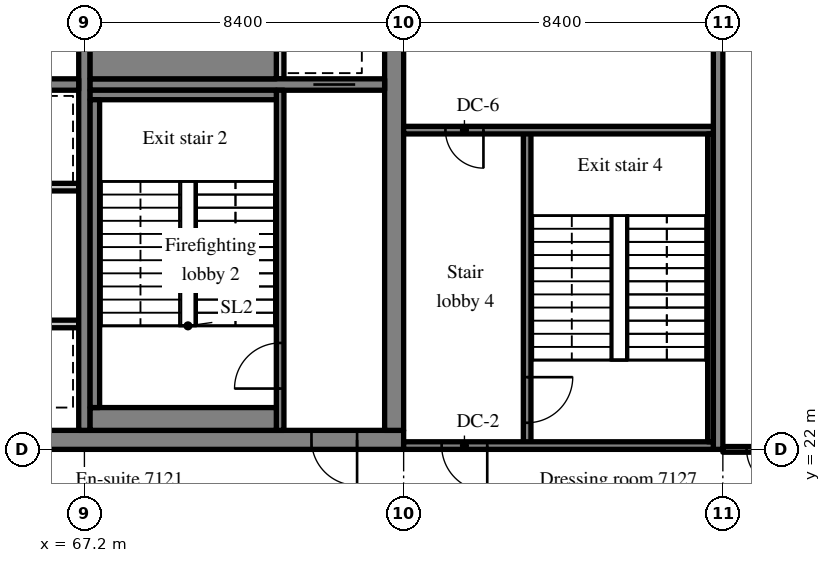
"""IFC4 building model, lengths in metres.
Left out: names, types, materials, properties, quantities, classifications, styles, units other than length and angle.
Written with IfcOpenShell. Run it as: python <this file> out.ifc"""

import sys

from ifc_helpers import new_model, si_unit, direction, frame, frame_2d, origin, place, context, subcontext, project, spatial, rectangle, extrude, source, transform, mapped, element, fill, save


model = new_model("IFC4")
c1 = context("Model", 3, precision=1e-05, world=origin(), true_north=direction((0.0, 1.0)))
c2 = subcontext(c1, "Body", "Model", "MODEL_VIEW")
j1 = project(units=[si_unit("LENGTHUNIT", "METRE"), si_unit("PLANEANGLEUNIT", "RADIAN")], contexts=[c1])
p1 = place(None, origin())
s1 = spatial("IfcSite", under=j1, at=p1, CompositionType="ELEMENT")
p2 = place(p1, origin())
s2 = spatial("IfcBuilding", under=s1, at=p2, CompositionType="ELEMENT")
p3 = place(p2, frame((0.0, 0.0, 297.7)))
s3 = spatial("IfcBuildingStorey", under=s2, at=p3, CompositionType="ELEMENT", Elevation=297.7)
m1 = source(origin(), c2, "Body", "SweptSolid", [
    extrude(rectangle(XDim=50.4, YDim=0.5, at=frame_2d((25.2, 0.0))), origin(), (0.0, 0.0, 1.0), 3.72),
])
p4 = place(p3, frame((25.2, 22.25, 0.0), z_axis=(0.0, 0.0, 1.0), x_axis=(1.0, 0.0, 0.0)))
e1 = element("IfcWall", 1, at=p4, inside=s3, PredefinedType="SHEAR", context=c2, shape_type="MappedRepresentation", body=[
    mapped(m1, transform((0.0, 0.0, 0.0), scale=1.0)),
])
m2 = source(origin(), c2, "Body", "SweptSolid", [
    extrude(rectangle(XDim=1.8, YDim=2.1, at=frame_2d((0.9, 1.05))), frame((0.0, 0.26, 0.0), z_axis=(0.0, -1.0, 0.0), x_axis=(1.0, 0.0, 0.0)), (0.0, 0.0, 1.0), 0.52),
])
p5 = place(p4, frame((15.9, 0.0, 0.0)))
e2 = element("IfcOpeningElement", 2, at=p5, cuts=e1, PredefinedType="OPENING", context=c2, shape_type="MappedRepresentation", body=[
    mapped(m2, transform((0.0, 0.0, 0.0), scale=1.0)),
])
m3 = source(origin(), c2, "Body", "SweptSolid", [
    extrude(rectangle(XDim=0.9, YDim=2.1, at=frame_2d((0.45, 1.05))), frame((0.0, 0.26, 0.0), z_axis=(0.0, -1.0, 0.0), x_axis=(1.0, 0.0, 0.0)), (0.0, 0.0, 1.0), 0.52),
])
p6 = place(p4, frame((9.675, 0.0, 0.0)))
e3 = element("IfcOpeningElement", 3, at=p6, cuts=e1, PredefinedType="OPENING", context=c2, shape_type="MappedRepresentation", body=[
    mapped(m3, transform((0.0, 0.0, 0.0), scale=1.0)),
])
p7 = place(p4, frame((21.525, 0.0, 0.0)))
e4 = element("IfcOpeningElement", 4, at=p7, cuts=e1, PredefinedType="OPENING", context=c2, shape_type="MappedRepresentation", body=[
    mapped(m3, transform((0.0, 0.0, 0.0), scale=1.0)),
])
p8 = place(p4, frame((32.7, 0.0, 0.0)))
e5 = element("IfcOpeningElement", 5, at=p8, cuts=e1, PredefinedType="OPENING", context=c2, shape_type="MappedRepresentation", body=[
    mapped(m2, transform((0.0, 0.0, 0.0), scale=1.0)),
])
m4 = source(origin(), c2, "Body", "SweptSolid", [
    extrude(rectangle(XDim=1.2, YDim=2.1, at=frame_2d((0.6, 1.05))), frame((0.0, 0.26, 0.0), z_axis=(0.0, -1.0, 0.0), x_axis=(1.0, 0.0, 0.0)), (0.0, 0.0, 1.0), 0.52),
])
p9 = place(p4, frame((6.5, 0.0, 0.0)))
e6 = element("IfcOpeningElement", 6, at=p9, cuts=e1, PredefinedType="OPENING", context=c2, shape_type="MappedRepresentation", body=[
    mapped(m4, transform((0.0, 0.0, 0.0), scale=1.0)),
])
p10 = place(p4, frame((47.975, 0.0, 0.0)))
e7 = element("IfcOpeningElement", 7, at=p10, cuts=e1, PredefinedType="OPENING", context=c2, shape_type="MappedRepresentation", body=[
    mapped(m4, transform((0.0, 0.0, 0.0), scale=1.0)),
])
m5 = source(origin(), c2, "Body", "SweptSolid", [
    extrude(rectangle(XDim=19.0, YDim=0.5, at=frame_2d((9.5, 0.0))), origin(), (0.0, 0.0, 1.0), 3.72),
])
p11 = place(p3, frame((75.35, 22.5, 0.0), z_axis=(0.0, 0.0, 1.0), x_axis=(0.0, 1.0, 0.0)))
e8 = element("IfcWall", 8, at=p11, inside=s3, PredefinedType="SHEAR", context=c2, shape_type="MappedRepresentation", body=[
    mapped(m5, transform((0.0, 0.0, 0.0), scale=1.0)),
])
p12 = place(p11, frame((12.9, 0.0, 0.0)))
e9 = element("IfcOpeningElement", 9, at=p12, cuts=e8, PredefinedType="OPENING", context=c2, shape_type="MappedRepresentation", body=[
    mapped(m4, transform((0.0, 0.0, 0.0), scale=1.0)),
])
m6 = source(origin(), c2, "Body", "SweptSolid", [
    extrude(rectangle(XDim=19.0, YDim=0.3, at=frame_2d((9.5, 0.0))), origin(), (0.0, 0.0, 1.0), 3.72),
])
p13 = place(p3, frame((67.2, 22.5, 0.0), z_axis=(0.0, 0.0, 1.0), x_axis=(0.0, 1.0, 0.0)))
e10 = element("IfcWall", 10, at=p13, inside=s3, PredefinedType="SHEAR", context=c2, shape_type="MappedRepresentation", body=[
    mapped(m6, transform((0.0, 0.0, 0.0), scale=1.0)),
])
m7 = source(origin(), c2, "Body", "SweptSolid", [
    extrude(rectangle(XDim=16.5, YDim=0.3, at=frame_2d((8.25, 0.0))), origin(), (0.0, 0.0, 1.0), 3.72),
])
p14 = place(p3, frame((50.55, 31.6, 0.0), z_axis=(0.0, 0.0, 1.0), x_axis=(1.0, 0.0, 0.0)))
e11 = element("IfcWall", 11, at=p14, inside=s3, PredefinedType="SHEAR", context=c2, shape_type="MappedRepresentation", body=[
    mapped(m7, transform((0.0, 0.0, 0.0), scale=1.0)),
])
m8 = source(origin(), c2, "Body", "SweptSolid", [
    extrude(rectangle(XDim=1.0, YDim=2.1, at=frame_2d((0.5, 1.05))), frame((0.0, 0.16, 0.0), z_axis=(0.0, -1.0, 0.0), x_axis=(1.0, 0.0, 0.0)), (0.0, 0.0, 1.0), 0.32),
])
p15 = place(p14, frame((0.625, 0.0, 0.0)))
e12 = element("IfcOpeningElement", 12, at=p15, cuts=e11, PredefinedType="OPENING", context=c2, shape_type="MappedRepresentation", body=[
    mapped(m8, transform((0.0, 0.0, 0.0), scale=1.0)),
])
m9 = source(origin(), c2, "Body", "SweptSolid", [
    extrude(rectangle(XDim=7.75, YDim=0.3, at=frame_2d((3.875, 0.0))), origin(), (0.0, 0.0, 1.0), 3.72),
])
p16 = place(p3, frame((67.35, 31.6, 0.0), z_axis=(0.0, 0.0, 1.0), x_axis=(1.0, 0.0, 0.0)))
e13 = element("IfcWall", 13, at=p16, inside=s3, PredefinedType="SHEAR", context=c2, shape_type="MappedRepresentation", body=[
    mapped(m9, transform((0.0, 0.0, 0.0), scale=1.0)),
])
m10 = source(origin(), c2, "Body", "SweptSolid", [
    extrude(rectangle(XDim=1.1, YDim=2.1, at=frame_2d((0.55, 1.05))), frame((0.0, 0.16, 0.0), z_axis=(0.0, -1.0, 0.0), x_axis=(1.0, 0.0, 0.0)), (0.0, 0.0, 1.0), 0.32),
])
p17 = place(p16, frame((5.875, 0.0, 0.0)))
e14 = element("IfcOpeningElement", 14, at=p17, cuts=e13, PredefinedType="OPENING", context=c2, shape_type="MappedRepresentation", body=[
    mapped(m10, transform((0.0, 0.0, 0.0), scale=1.0)),
])
m11 = source(origin(), c2, "Body", "SweptSolid", [
    extrude(rectangle(XDim=18.4, YDim=0.25, at=frame_2d((9.2, 0.0))), origin(), (0.0, 0.0, 1.0), 3.72),
])
p18 = place(p3, frame((83.875, 22.0, 0.0), z_axis=(0.0, 0.0, 1.0), x_axis=(0.0, 1.0, 0.0)))
e15 = element("IfcWall", 15, at=p18, inside=s3, PredefinedType="SHEAR", context=c2, shape_type="MappedRepresentation", body=[
    mapped(m11, transform((0.0, 0.0, 0.0), scale=1.0)),
])
m12 = source(origin(), c2, "Body", "SweptSolid", [
    extrude(rectangle(XDim=6.15, YDim=0.2, at=frame_2d((3.075, 0.0))), origin(), (0.0, 0.0, 1.0), 3.72),
])
p19 = place(p3, frame((67.05, 25.3, 0.0), z_axis=(0.0, 0.0, 1.0), x_axis=(-1.0, 0.0, 0.0)))
e16 = element("IfcWall", 16, at=p19, inside=s3, PredefinedType="SOLIDWALL", context=c2, shape_type="MappedRepresentation", body=[
    mapped(m12, transform((0.0, 0.0, 0.0), scale=1.0)),
])
m13 = source(origin(), c2, "Body", "SweptSolid", [
    extrude(rectangle(XDim=1.1, YDim=2.1, at=frame_2d((0.55, 1.05))), frame((0.0, 0.11, 0.0), z_axis=(0.0, -1.0, 0.0), x_axis=(1.0, 0.0, 0.0)), (0.0, 0.0, 1.0), 0.22),
])
p20 = place(p19, frame((1.1, 0.0, 0.0)))
e17 = element("IfcOpeningElement", 17, at=p20, cuts=e16, PredefinedType="OPENING", context=c2, shape_type="MappedRepresentation", body=[
    mapped(m13, transform((0.0, 0.0, 0.0), scale=1.0)),
])
p21 = place(p19, frame((4.1, 0.0, 0.0)))
e18 = element("IfcOpeningElement", 18, at=p21, cuts=e16, PredefinedType="OPENING", context=c2, shape_type="MappedRepresentation", body=[
    mapped(m13, transform((0.0, 0.0, 0.0), scale=1.0)),
])
m14 = source(origin(), c2, "Body", "SweptSolid", [
    extrude(rectangle(XDim=12.15, YDim=0.2, at=frame_2d((6.075, 0.0))), origin(), (0.0, 0.0, 1.0), 3.72),
])
p22 = place(p3, frame((67.05, 28.9, 0.0), z_axis=(0.0, 0.0, 1.0), x_axis=(-1.0, 0.0, 0.0)))
e19 = element("IfcWall", 19, at=p22, inside=s3, PredefinedType="SOLIDWALL", context=c2, shape_type="MappedRepresentation", body=[
    mapped(m14, transform((0.0, 0.0, 0.0), scale=1.0)),
])
p23 = place(p22, frame((1.1, 0.0, 0.0)))
e20 = element("IfcOpeningElement", 20, at=p23, cuts=e19, PredefinedType="OPENING", context=c2, shape_type="MappedRepresentation", body=[
    mapped(m13, transform((0.0, 0.0, 0.0), scale=1.0)),
])
p24 = place(p22, frame((4.1, 0.0, 0.0)))
e21 = element("IfcOpeningElement", 21, at=p24, cuts=e19, PredefinedType="OPENING", context=c2, shape_type="MappedRepresentation", body=[
    mapped(m13, transform((0.0, 0.0, 0.0), scale=1.0)),
])
m15 = source(origin(), c2, "Body", "SweptSolid", [
    extrude(rectangle(XDim=8.95, YDim=0.2, at=frame_2d((4.475, 0.0))), origin(), (0.0, 0.0, 1.0), 3.72),
])
p25 = place(p3, frame((72.35, 22.5, 0.0), z_axis=(0.0, 0.0, 1.0), x_axis=(0.0, 1.0, 0.0)))
e22 = element("IfcWall", 22, at=p25, inside=s3, PredefinedType="SOLIDWALL", context=c2, shape_type="MappedRepresentation", body=[
    mapped(m15, transform((0.0, 0.0, 0.0), scale=1.0)),
])
m16 = source(origin(), c2, "Body", "SweptSolid", [
    extrude(rectangle(XDim=1.2, YDim=2.1, at=frame_2d((0.6, 1.05))), frame((0.0, 0.11, 0.0), z_axis=(0.0, -1.0, 0.0), x_axis=(1.0, 0.0, 0.0)), (0.0, 0.0, 1.0), 0.22),
])
p26 = place(p25, frame((1.1, 0.0, 0.0)))
e23 = element("IfcOpeningElement", 23, at=p26, cuts=e22, PredefinedType="OPENING", context=c2, shape_type="MappedRepresentation", body=[
    mapped(m16, transform((0.0, 0.0, 0.0), scale=1.0)),
])
m17 = source(origin(), c2, "Body", "SweptSolid", [
    extrude(rectangle(XDim=1.85, YDim=0.2, at=frame_2d((0.925, 0.0))), origin(), (0.0, 0.0, 1.0), 3.72),
])
p27 = place(p3, frame((72.35, 31.75, 0.0), z_axis=(0.0, 0.0, 1.0), x_axis=(0.0, 1.0, 0.0)))
e24 = element("IfcWall", 24, at=p27, inside=s3, PredefinedType="SOLIDWALL", context=c2, shape_type="MappedRepresentation", body=[
    mapped(m17, transform((0.0, 0.0, 0.0), scale=1.0)),
])
m18 = source(origin(), c2, "Body", "SweptSolid", [
    extrude(rectangle(XDim=8.3, YDim=0.2, at=frame_2d((4.15, 0.0))), origin(), (0.0, 0.0, 1.0), 3.72),
])
p28 = place(p3, frame((78.85, 22.1, 0.0), z_axis=(0.0, 0.0, 1.0), x_axis=(0.0, 1.0, 0.0)))
e25 = element("IfcWall", 25, at=p28, inside=s3, PredefinedType="SOLIDWALL", context=c2, shape_type="MappedRepresentation", body=[
    mapped(m18, transform((0.0, 0.0, 0.0), scale=1.0)),
])
p29 = place(p28, frame((0.6, 0.0, 0.0)))
e26 = element("IfcOpeningElement", 26, at=p29, cuts=e25, PredefinedType="OPENING", context=c2, shape_type="MappedRepresentation", body=[
    mapped(m16, transform((0.0, 0.0, 0.0), scale=1.0)),
])
m19 = source(origin(), c2, "Body", "SweptSolid", [
    extrude(rectangle(XDim=8.15, YDim=0.2, at=frame_2d((4.075, 0.0))), origin(), (0.0, 0.0, 1.0), 3.72),
])
p30 = place(p3, frame((83.75, 22.1, 0.0), z_axis=(0.0, 0.0, 1.0), x_axis=(-1.0, 0.0, 0.0)))
e27 = element("IfcWall", 27, at=p30, inside=s3, PredefinedType="SOLIDWALL", context=c2, shape_type="MappedRepresentation", body=[
    mapped(m19, transform((0.0, 0.0, 0.0), scale=1.0)),
])
p31 = place(p30, frame((5.95, 0.0, 0.0)))
e28 = element("IfcOpeningElement", 28, at=p31, cuts=e27, PredefinedType="OPENING", context=c2, shape_type="MappedRepresentation", body=[
    mapped(m16, transform((0.0, 0.0, 0.0), scale=1.0)),
])
p32 = place(p3, frame((83.75, 30.4, 0.0), z_axis=(0.0, 0.0, 1.0), x_axis=(-1.0, 0.0, 0.0)))
e29 = element("IfcWall", 29, at=p32, inside=s3, PredefinedType="SOLIDWALL", context=c2, shape_type="MappedRepresentation", body=[
    mapped(m19, transform((0.0, 0.0, 0.0), scale=1.0)),
])
m20 = source(origin(), c2, "Body", "SweptSolid", [
    extrude(rectangle(XDim=1.0, YDim=2.1, at=frame_2d((0.5, 1.05))), frame((0.0, 0.11, 0.0), z_axis=(0.0, -1.0, 0.0), x_axis=(1.0, 0.0, 0.0)), (0.0, 0.0, 1.0), 0.22),
])
p33 = place(p32, frame((6.05, 0.0, 0.0)))
e30 = element("IfcOpeningElement", 30, at=p33, cuts=e29, PredefinedType="OPENING", context=c2, shape_type="MappedRepresentation", body=[
    mapped(m20, transform((0.0, 0.0, 0.0), scale=1.0)),
])
m21 = source(origin(), c2, "Body", "SweptSolid", [
    extrude(rectangle(XDim=4.9, YDim=0.6, at=frame_2d((2.45, 0.0))), origin(), (0.0, 0.0, 1.0), 3.72),
])
p34 = place(p3, frame((67.35, 22.8, 0.0), z_axis=(0.0, 0.0, 1.0), x_axis=(1.0, 0.0, 0.0)))
e31 = element("IfcWall", 31, at=p34, inside=s3, PredefinedType="SOLIDWALL", context=c2, shape_type="MappedRepresentation", body=[
    mapped(m21, transform((0.0, 0.0, 0.0), scale=1.0)),
])
m22 = source(origin(), c2, "Body", "SweptSolid", [
    extrude(rectangle(XDim=4.9, YDim=0.25, at=frame_2d((2.45, 0.0))), origin(), (0.0, 0.0, 1.0), 3.72),
])
p35 = place(p3, frame((67.35, 31.325, 0.0), z_axis=(0.0, 0.0, 1.0), x_axis=(1.0, 0.0, 0.0)))
e32 = element("IfcWall", 32, at=p35, inside=s3, PredefinedType="SOLIDWALL", context=c2, shape_type="MappedRepresentation", body=[
    mapped(m22, transform((0.0, 0.0, 0.0), scale=1.0)),
])
m23 = source(origin(), c2, "Body", "SweptSolid", [
    extrude(rectangle(XDim=8.1, YDim=0.25, at=frame_2d((4.05, 0.0))), origin(), (0.0, 0.0, 1.0), 3.72),
])
p36 = place(p3, frame((67.475, 23.1, 0.0), z_axis=(0.0, 0.0, 1.0), x_axis=(0.0, 1.0, 0.0)))
e33 = element("IfcWall", 33, at=p36, inside=s3, PredefinedType="SOLIDWALL", context=c2, shape_type="MappedRepresentation", body=[
    mapped(m23, transform((0.0, 0.0, 0.0), scale=1.0)),
])
m24 = source(origin(), c2, "Body", "SweptSolid", [
    extrude(rectangle(XDim=4.9, YDim=1.05, at=frame_2d((2.45, 0.0))), origin(), (0.0, 0.0, 1.0), 3.72),
])
p37 = place(p3, frame((67.35, 32.275, 0.0), z_axis=(0.0, 0.0, 1.0), x_axis=(1.0, 0.0, 0.0)))
e34 = element("IfcWall", 34, at=p37, inside=s3, PredefinedType="SOLIDWALL", context=c2, shape_type="MappedRepresentation", body=[
    mapped(m24, transform((0.0, 0.0, 0.0), scale=1.0)),
])
m25 = source(origin(), c2, "Body", "SweptSolid", [
    extrude(rectangle(XDim=8.1, YDim=0.15, at=frame_2d((4.05, 0.0))), origin(), (0.0, 0.0, 1.0), 3.72),
])
p38 = place(p3, frame((83.675, 22.2, 0.0), z_axis=(0.0, 0.0, 1.0), x_axis=(0.0, 1.0, 0.0)))
e35 = element("IfcWall", 35, at=p38, inside=s3, PredefinedType="SOLIDWALL", context=c2, shape_type="MappedRepresentation", body=[
    mapped(m25, transform((0.0, 0.0, 0.0), scale=1.0)),
])
m26 = source(origin(), c2, "Body", "SweptSolid", [
    extrude(rectangle(XDim=1.9, YDim=0.15, at=frame_2d((0.95, 0.0))), origin(), (0.0, 0.0, 1.0), 3.02),
])
p39 = place(p3, frame((84.0, 22.0, 0.0), z_axis=(0.0, 0.0, 1.0), x_axis=(1.0, 0.0, 0.0)))
e36 = element("IfcWall", 36, at=p39, inside=s3, PredefinedType="PARTITIONING", context=c2, shape_type="MappedRepresentation", body=[
    mapped(m26, transform((0.0, 0.0, 0.0), scale=1.0)),
])
m27 = source(origin(), c2, "Body", "SweptSolid", [
    extrude(rectangle(XDim=1.0, YDim=2.1, at=frame_2d((0.5, 1.05))), frame((0.0, 0.085, 0.0), z_axis=(0.0, -1.0, 0.0), x_axis=(1.0, 0.0, 0.0)), (0.0, 0.0, 1.0), 0.17),
])
p40 = place(p39, frame((0.625, 0.0, 0.0)))
e37 = element("IfcOpeningElement", 37, at=p40, cuts=e36, PredefinedType="OPENING", context=c2, shape_type="MappedRepresentation", body=[
    mapped(m27, transform((0.0, 0.0, 0.0), scale=1.0)),
])
m28 = source(origin(), c2, "Body", "SweptSolid", [
    extrude(rectangle(XDim=1.2, YDim=2.1, at=frame_2d((0.6, 1.05))), frame((0.0, 0.025, 0.0), z_axis=(0.0, -1.0, 0.0), x_axis=(1.0, 0.0, 0.0)), (0.0, 0.0, 1.0), 0.05),
])
p41 = place(p26, origin())
e38 = element("IfcDoor", 38, at=p41, inside=s3, OperationType="SINGLE_SWING_LEFT", PredefinedType="DOOR", context=c2, shape_type="MappedRepresentation", body=[
    mapped(m28, transform((0.0, 0.0, 0.0), scale=1.0)),
])
fill(e23, e38)
m29 = source(origin(), c2, "Body", "SweptSolid", [
    extrude(rectangle(XDim=1.2, YDim=2.1, at=frame_2d((0.6, 1.05))), frame((0.0, 0.175, 0.0), z_axis=(0.0, -1.0, 0.0), x_axis=(1.0, 0.0, 0.0)), (0.0, 0.0, 1.0), 0.05),
])
p42 = place(p10, origin())
e39 = element("IfcDoor", 39, at=p42, inside=s3, OperationType="SINGLE_SWING_RIGHT", PredefinedType="DOOR", context=c2, shape_type="MappedRepresentation", body=[
    mapped(m29, transform((0.0, 0.0, 0.0), scale=1.0)),
])
fill(e7, e39)
m30 = source(origin(), c2, "Body", "SweptSolid", [
    extrude(rectangle(XDim=1.1, YDim=2.1, at=frame_2d((0.55, 1.05))), frame((0.0, 0.025, 0.0), z_axis=(0.0, -1.0, 0.0), x_axis=(1.0, 0.0, 0.0)), (0.0, 0.0, 1.0), 0.05),
])
p43 = place(p17, origin())
e40 = element("IfcDoor", 40, at=p43, inside=s3, OperationType="SLIDING_TO_LEFT", PredefinedType="DOOR", context=c2, shape_type="MappedRepresentation", body=[
    mapped(m30, transform((0.0, 0.0, 0.0), scale=1.0)),
])
fill(e14, e40)
p44 = place(p29, origin())
e41 = element("IfcDoor", 41, at=p44, inside=s3, OperationType="SINGLE_SWING_RIGHT", PredefinedType="DOOR", context=c2, shape_type="MappedRepresentation", body=[
    mapped(m28, transform((0.0, 0.0, 0.0), scale=1.0)),
])
fill(e26, e41)
p45 = place(p31, origin())
e42 = element("IfcDoor", 42, at=p45, inside=s3, OperationType="SINGLE_SWING_LEFT", PredefinedType="DOOR", context=c2, shape_type="MappedRepresentation", body=[
    mapped(m28, transform((0.0, 0.0, 0.0), scale=1.0)),
])
fill(e28, e42)
m31 = source(origin(), c2, "Body", "SweptSolid", [
    extrude(rectangle(XDim=1.0, YDim=2.1, at=frame_2d((0.5, 1.05))), frame((0.0, 0.025, 0.0), z_axis=(0.0, -1.0, 0.0), x_axis=(1.0, 0.0, 0.0)), (0.0, 0.0, 1.0), 0.05),
])
p46 = place(p33, origin())
e43 = element("IfcDoor", 43, at=p46, inside=s3, OperationType="SINGLE_SWING_LEFT", PredefinedType="DOOR", context=c2, shape_type="MappedRepresentation", body=[
    mapped(m31, transform((0.0, 0.0, 0.0), scale=1.0)),
])
fill(e30, e43)
p47 = place(p40, origin())
e44 = element("IfcDoor", 44, at=p47, inside=s3, OperationType="SINGLE_SWING_RIGHT", PredefinedType="DOOR", context=c2, shape_type="MappedRepresentation", body=[
    mapped(m31, transform((0.0, 0.0, 0.0), scale=1.0)),
])
fill(e37, e44)
save(model, sys.argv[1])
